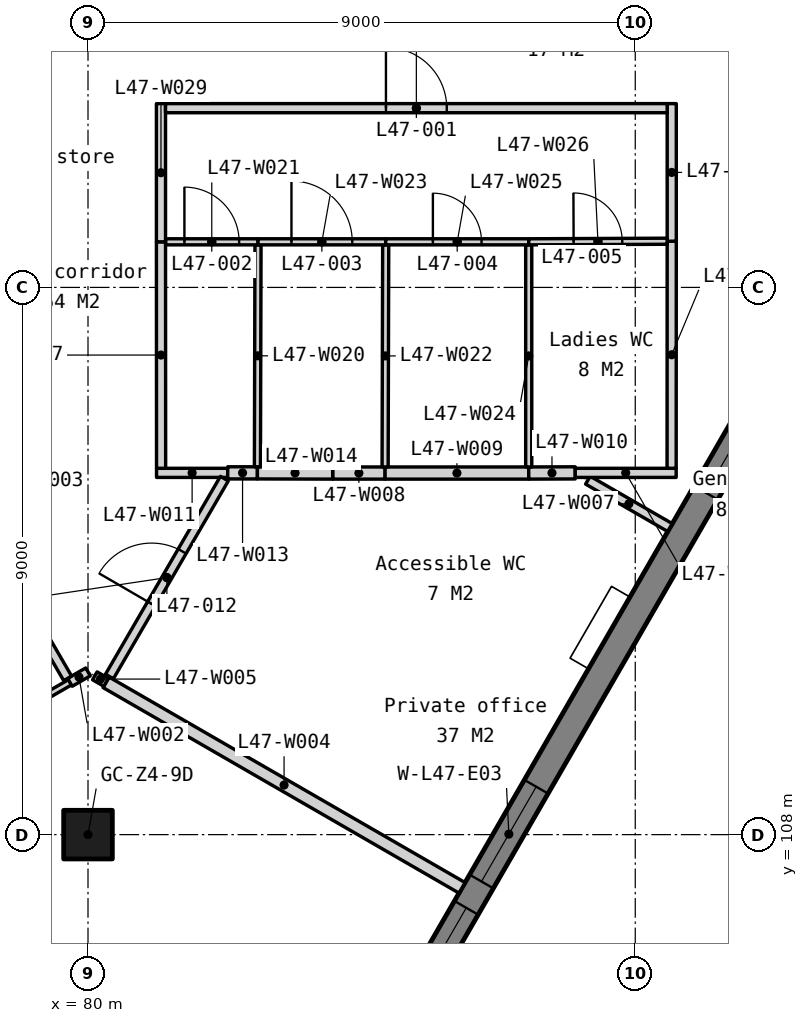
"""IFC4 building model, lengths in metres.
Left out: names, types, materials, properties, quantities, classifications, styles, units other than length and angle.
Written with IfcOpenShell. Run it as: python <this file> out.ifc"""

import sys

from ifc_helpers import new_model, si_unit, direction, frame, frame_2d, origin, origin_2d, place, context, subcontext, project, spatial, polyline, rectangle, outline, extrude, element, fill, save


model = new_model("IFC4")
c1 = context("Model", 3, precision=1e-05, world=origin(), true_north=direction((0.0, 1.0)))
c2 = subcontext(c1, "Body", "Model", "MODEL_VIEW")
j1 = project(units=[si_unit("LENGTHUNIT", "METRE"), si_unit("PLANEANGLEUNIT", "RADIAN")], contexts=[c1])
p1 = place(None, origin())
s1 = spatial("IfcSite", under=j1, at=p1, CompositionType="ELEMENT")
p2 = place(p1, origin())
s2 = spatial("IfcBuilding", under=s1, at=p2, CompositionType="ELEMENT")
p3 = place(p2, frame((0.0, 0.0, 188.0)))
s3 = spatial("IfcBuildingStorey", under=s2, at=p3, CompositionType="ELEMENT", Elevation=188.0)
p4 = place(p3, frame((80.0, 108.0, 0.0), z_axis=(0.0, 0.0, 1.0), x_axis=(1.0, 0.0, 0.0)))
e1 = element("IfcColumn", 1, at=p4, inside=s3, PredefinedType="COLUMN", context=c2, shape_type="SweptSolid", body=[
    extrude(rectangle(XDim=0.8, YDim=0.8, at=origin_2d()), origin(), (0.0, 0.0, 1.0), 3.9),
])
p5 = place(p3, frame((81.505, 98.627, -0.15), z_axis=(0.0, 0.0, 1.0), x_axis=(0.500002199942, 0.866024133644, 0.0)))
e2 = element("IfcWall", 2, at=p5, inside=s3, PredefinedType="SOLIDWALL", context=c2, shape_type="SweptSolid", body=[
    extrude(outline(polyline([(38.729, 0.0), (38.729, 3.9), (0.0, 3.9), (0.0, 0.0), (38.729, 0.0)])), frame((0.0, 0.225, 0.0), z_axis=(0.0, -1.0, 0.0), x_axis=(1.0, 0.0, 0.0)), (0.0, 0.0, 1.0), 0.45),
])
p6 = place(p5, frame((0.807, 0.0, 0.95)))
e3 = element("IfcOpeningElement", 3, at=p6, cuts=e2, PredefinedType="OPENING", context=c2, shape_type="SweptSolid", body=[
    extrude(rectangle(XDim=1.2, YDim=2.2, at=frame_2d((0.6, 1.1))), frame((0.0, 0.235, 0.0), z_axis=(0.0, -1.0, 0.0), x_axis=(1.0, 0.0, 0.0)), (0.0, 0.0, 1.0), 0.47),
])
p7 = place(p5, frame((7.632, 0.0, 0.95)))
e4 = element("IfcOpeningElement", 4, at=p7, cuts=e2, PredefinedType="OPENING", context=c2, shape_type="SweptSolid", body=[
    extrude(rectangle(XDim=1.8, YDim=2.2, at=frame_2d((0.9, 1.1))), frame((0.0, 0.235, 0.0), z_axis=(0.0, -1.0, 0.0), x_axis=(1.0, 0.0, 0.0)), (0.0, 0.0, 1.0), 0.47),
])
p8 = place(p5, frame((9.932, 0.0, 0.95)))
e5 = element("IfcOpeningElement", 5, at=p8, cuts=e2, PredefinedType="OPENING", context=c2, shape_type="SweptSolid", body=[
    extrude(rectangle(XDim=1.8, YDim=2.2, at=frame_2d((0.9, 1.1))), frame((0.0, 0.235, 0.0), z_axis=(0.0, -1.0, 0.0), x_axis=(1.0, 0.0, 0.0)), (0.0, 0.0, 1.0), 0.47),
])
p9 = place(p5, frame((17.315, 0.0, 0.95)))
e6 = element("IfcOpeningElement", 6, at=p9, cuts=e2, PredefinedType="OPENING", context=c2, shape_type="SweptSolid", body=[
    extrude(rectangle(XDim=1.8, YDim=2.2, at=frame_2d((0.9, 1.1))), frame((0.0, 0.235, 0.0), z_axis=(0.0, -1.0, 0.0), x_axis=(1.0, 0.0, 0.0)), (0.0, 0.0, 1.0), 0.47),
])
p10 = place(p5, frame((19.615, 0.0, 0.95)))
e7 = element("IfcOpeningElement", 7, at=p10, cuts=e2, PredefinedType="OPENING", context=c2, shape_type="SweptSolid", body=[
    extrude(rectangle(XDim=1.8, YDim=2.2, at=frame_2d((0.9, 1.1))), frame((0.0, 0.235, 0.0), z_axis=(0.0, -1.0, 0.0), x_axis=(1.0, 0.0, 0.0)), (0.0, 0.0, 1.0), 0.47),
])
p11 = place(p5, frame((26.997, 0.0, 0.95)))
e8 = element("IfcOpeningElement", 8, at=p11, cuts=e2, PredefinedType="OPENING", context=c2, shape_type="SweptSolid", body=[
    extrude(rectangle(XDim=1.8, YDim=2.2, at=frame_2d((0.9, 1.1))), frame((0.0, 0.235, 0.0), z_axis=(0.0, -1.0, 0.0), x_axis=(1.0, 0.0, 0.0)), (0.0, 0.0, 1.0), 0.47),
])
p12 = place(p5, frame((29.297, 0.0, 0.95)))
e9 = element("IfcOpeningElement", 9, at=p12, cuts=e2, PredefinedType="OPENING", context=c2, shape_type="SweptSolid", body=[
    extrude(rectangle(XDim=1.8, YDim=2.2, at=frame_2d((0.9, 1.1))), frame((0.0, 0.235, 0.0), z_axis=(0.0, -1.0, 0.0), x_axis=(1.0, 0.0, 0.0)), (0.0, 0.0, 1.0), 0.47),
])
p13 = place(p5, frame((36.722, 0.0, 0.95)))
e10 = element("IfcOpeningElement", 10, at=p13, cuts=e2, PredefinedType="OPENING", context=c2, shape_type="SweptSolid", body=[
    extrude(rectangle(XDim=1.2, YDim=2.2, at=frame_2d((0.6, 1.1))), frame((0.0, 0.235, 0.0), z_axis=(0.0, -1.0, 0.0), x_axis=(1.0, 0.0, 0.0)), (0.0, 0.0, 1.0), 0.47),
])
p14 = place(p3, frame((73.849, 107.125, 0.0), z_axis=(0.0, 0.0, 1.0), x_axis=(0.866029815523, 0.499992358568, 0.0)))
e11 = element("IfcWall", 11, at=p14, inside=s3, PredefinedType="PARTITIONING", context=c2, shape_type="SweptSolid", body=[
    extrude(rectangle(XDim=6.76, YDim=0.1, at=frame_2d((3.38, 0.0))), origin(), (0.0, 0.0, 1.0), 3.75),
])
p15 = place(p14, frame((2.93, 0.0, 0.0)))
e12 = element("IfcOpeningElement", 12, at=p15, cuts=e11, PredefinedType="OPENING", context=c2, shape_type="SweptSolid", body=[
    extrude(rectangle(XDim=0.9, YDim=2.1, at=frame_2d((0.45, 1.05))), frame((0.0, 0.06, 0.0), z_axis=(0.0, -1.0, 0.0), x_axis=(1.0, 0.0, 0.0)), (0.0, 0.0, 1.0), 0.12),
])
p16 = place(p3, frame((79.703, 110.505, 0.0), z_axis=(0.0, 0.0, 1.0), x_axis=(0.865913012852, 0.500194616298, 0.0)))
e13 = element("IfcWall", 13, at=p16, inside=s3, PredefinedType="PARTITIONING", context=c2, shape_type="SweptSolid", body=[
    extrude(rectangle(XDim=0.343, YDim=0.15, at=frame_2d((0.171, 0.0))), origin(), (0.0, 0.0, 1.0), 3.75),
])
p17 = place(p3, frame((77.274, 114.693, 0.0), z_axis=(0.0, 0.0, 1.0), x_axis=(0.501799348286, -0.864984054223, 0.0)))
e14 = element("IfcWall", 14, at=p17, inside=s3, PredefinedType="PARTITIONING", context=c2, shape_type="SweptSolid", body=[
    extrude(rectangle(XDim=4.766, YDim=0.15, at=frame_2d((2.383, 0.0))), origin(), (0.0, 0.0, 1.0), 3.75),
])
p18 = place(p17, frame((1.883, 0.0, 0.0)))
e15 = element("IfcOpeningElement", 15, at=p18, cuts=e14, PredefinedType="OPENING", context=c2, shape_type="SweptSolid", body=[
    extrude(rectangle(XDim=1.0, YDim=2.1, at=frame_2d((0.5, 1.05))), frame((0.0, 0.085, 0.0), z_axis=(0.0, -1.0, 0.0), x_axis=(1.0, 0.0, 0.0)), (0.0, 0.0, 1.0), 0.17),
])
p19 = place(p3, frame((80.297, 110.505, 0.0), z_axis=(0.0, 0.0, 1.0), x_axis=(0.866029815523, -0.499992358568, 0.0)))
e16 = element("IfcWall", 16, at=p19, inside=s3, PredefinedType="PARTITIONING", context=c2, shape_type="SweptSolid", body=[
    extrude(rectangle(XDim=6.76, YDim=0.2, at=frame_2d((3.38, 0.0))), origin(), (0.0, 0.0, 1.0), 3.75),
])
p20 = place(p3, frame((80.113, 110.612, 0.0), z_axis=(0.0, 0.0, 1.0), x_axis=(0.865765842911, -0.500449303376, 0.0)))
e17 = element("IfcWall", 17, at=p20, inside=s3, PredefinedType="PARTITIONING", context=c2, shape_type="SweptSolid", body=[
    extrude(rectangle(XDim=0.213, YDim=0.15, at=frame_2d((0.106, 0.0))), origin(), (0.0, 0.0, 1.0), 3.75),
])
p21 = place(p3, frame((88.221, 113.83, 0.0), z_axis=(0.0, 0.0, 1.0), x_axis=(0.865997745606, -0.500047902311, 0.0)))
e18 = element("IfcWall", 18, at=p21, inside=s3, PredefinedType="PARTITIONING", context=c2, shape_type="SweptSolid", body=[
    extrude(rectangle(XDim=1.558, YDim=0.15, at=frame_2d((0.779, 0.0))), origin(), (0.0, 0.0, 1.0), 3.75),
])
p22 = place(p3, frame((84.024, 113.947, 0.0), z_axis=(0.0, 0.0, 1.0), x_axis=(1.0, 0.0, 0.0)))
e19 = element("IfcWall", 19, at=p22, inside=s3, PredefinedType="PARTITIONING", context=c2, shape_type="SweptSolid", body=[
    extrude(rectangle(XDim=0.862, YDim=0.2, at=frame_2d((0.431, 0.0))), origin(), (0.0, 0.0, 1.0), 3.75),
])
p23 = place(p3, frame((84.886, 113.947, 0.0), z_axis=(0.0, 0.0, 1.0), x_axis=(1.0, 0.0, 0.0)))
e20 = element("IfcWall", 20, at=p23, inside=s3, PredefinedType="PARTITIONING", context=c2, shape_type="SweptSolid", body=[
    extrude(rectangle(XDim=2.362, YDim=0.2, at=frame_2d((1.181, 0.0))), origin(), (0.0, 0.0, 1.0), 3.75),
])
p24 = place(p3, frame((87.248, 113.947, 0.0), z_axis=(0.0, 0.0, 1.0), x_axis=(0.9999926602, 0.003831389503, 0.0)))
e21 = element("IfcWall", 21, at=p24, inside=s3, PredefinedType="PARTITIONING", context=c2, shape_type="SweptSolid", body=[
    extrude(rectangle(XDim=0.765, YDim=0.2, at=frame_2d((0.382, 0.0))), origin(), (0.0, 0.0, 1.0), 3.75),
])
p25 = place(p3, frame((81.127, 113.95, 0.0), z_axis=(0.0, 0.0, 1.0), x_axis=(1.0, 0.0, 0.0)))
e22 = element("IfcWall", 22, at=p25, inside=s3, PredefinedType="PARTITIONING", context=c2, shape_type="SweptSolid", body=[
    extrude(rectangle(XDim=1.17, YDim=0.15, at=frame_2d((0.585, 0.0))), origin(), (0.0, 0.0, 1.0), 3.75),
])
p26 = place(p3, frame((80.352, 110.6, 0.0), z_axis=(0.0, 0.0, 1.0), x_axis=(0.502155861577, 0.864777133534, 0.0)))
e23 = element("IfcWall", 23, at=p26, inside=s3, PredefinedType="PARTITIONING", context=c2, shape_type="SweptSolid", body=[
    extrude(rectangle(XDim=3.764, YDim=0.15, at=frame_2d((1.882, 0.0))), origin(), (0.0, 0.0, 1.0), 3.75),
])
p27 = place(p26, frame((1.382, 0.0, 0.0)))
e24 = element("IfcOpeningElement", 24, at=p27, cuts=e23, PredefinedType="OPENING", context=c2, shape_type="SweptSolid", body=[
    extrude(rectangle(XDim=1.0, YDim=2.1, at=frame_2d((0.5, 1.05))), frame((0.0, 0.085, 0.0), z_axis=(0.0, -1.0, 0.0), x_axis=(1.0, 0.0, 0.0)), (0.0, 0.0, 1.0), 0.17),
])
p28 = place(p3, frame((82.297, 113.95, 0.0), z_axis=(0.0, 0.0, 1.0), x_axis=(1.0, 0.0, 0.0)))
e25 = element("IfcWall", 25, at=p28, inside=s3, PredefinedType="PARTITIONING", context=c2, shape_type="SweptSolid", body=[
    extrude(rectangle(XDim=0.489, YDim=0.2, at=frame_2d((0.244, 0.0))), origin(), (0.0, 0.0, 1.0), 3.75),
])
p29 = place(p3, frame((82.786, 113.95, 0.0), z_axis=(0.0, 0.0, 1.0), x_axis=(0.999997200094, -0.002366390535, 0.0)))
e26 = element("IfcWall", 26, at=p29, inside=s3, PredefinedType="PARTITIONING", context=c2, shape_type="SweptSolid", body=[
    extrude(rectangle(XDim=1.238, YDim=0.2, at=frame_2d((0.619, 0.0))), origin(), (0.0, 0.0, 1.0), 3.75),
])
p30 = place(p3, frame((88.013, 113.95, 0.0), z_axis=(0.0, 0.0, 1.0), x_axis=(1.0, 0.0, 0.0)))
e27 = element("IfcWall", 27, at=p30, inside=s3, PredefinedType="PARTITIONING", context=c2, shape_type="SweptSolid", body=[
    extrude(rectangle(XDim=1.66, YDim=0.15, at=frame_2d((0.83, 0.0))), origin(), (0.0, 0.0, 1.0), 3.75),
])
p31 = place(p3, frame((89.598, 114.025, 0.0), z_axis=(0.0, 0.0, 1.0), x_axis=(0.000588273642, 0.999999826967, 0.0)))
e28 = element("IfcWall", 28, at=p31, inside=s3, PredefinedType="PARTITIONING", context=c2, shape_type="SweptSolid", body=[
    extrude(rectangle(XDim=3.735, YDim=0.15, at=frame_2d((1.868, 0.0))), origin(), (0.0, 0.0, 1.0), 3.75),
])
p32 = place(p3, frame((89.6, 117.76, 0.0), z_axis=(0.0, 0.0, 1.0), x_axis=(0.0, 1.0, 0.0)))
e29 = element("IfcWall", 29, at=p32, inside=s3, PredefinedType="PARTITIONING", context=c2, shape_type="SweptSolid", body=[
    extrude(rectangle(XDim=2.263, YDim=0.15, at=frame_2d((1.131, 0.0))), origin(), (0.0, 0.0, 1.0), 3.75),
])
p33 = place(p3, frame((82.786, 114.05, 0.0), z_axis=(0.0, 0.0, 1.0), x_axis=(0.002608686776, 0.999996597371, 0.0)))
e30 = element("IfcWall", 30, at=p33, inside=s3, PredefinedType="PARTITIONING", context=c2, shape_type="SweptSolid", body=[
    extrude(rectangle(XDim=3.65, YDim=0.1, at=frame_2d((1.825, 0.0))), origin(), (0.0, 0.0, 1.0), 3.75),
])
p34 = place(p3, frame((81.275, 117.75, 0.0), z_axis=(0.0, 0.0, 1.0), x_axis=(1.0, 0.0, 0.0)))
e31 = element("IfcWall", 31, at=p34, inside=s3, PredefinedType="PARTITIONING", context=c2, shape_type="SweptSolid", body=[
    extrude(rectangle(XDim=1.521, YDim=0.1, at=frame_2d((0.76, 0.0))), origin(), (0.0, 0.0, 1.0), 3.75),
])
p35 = place(p34, frame((0.311, 0.0, 0.0)))
e32 = element("IfcOpeningElement", 32, at=p35, cuts=e31, PredefinedType="OPENING", context=c2, shape_type="SweptSolid", body=[
    extrude(rectangle(XDim=0.9, YDim=2.1, at=frame_2d((0.45, 1.05))), frame((0.0, 0.06, 0.0), z_axis=(0.0, -1.0, 0.0), x_axis=(1.0, 0.0, 0.0)), (0.0, 0.0, 1.0), 0.12),
])
p36 = place(p3, frame((84.886, 114.047, 0.0), z_axis=(0.0, 0.0, 1.0), x_axis=(0.00260659454, 0.999996602827, 0.0)))
e33 = element("IfcWall", 33, at=p36, inside=s3, PredefinedType="PARTITIONING", context=c2, shape_type="SweptSolid", body=[
    extrude(rectangle(XDim=3.653, YDim=0.1, at=frame_2d((1.826, 0.0))), origin(), (0.0, 0.0, 1.0), 3.75),
])
p37 = place(p3, frame((82.796, 117.75, 0.0), z_axis=(0.0, 0.0, 1.0), x_axis=(1.0, 0.0, 0.0)))
e34 = element("IfcWall", 34, at=p37, inside=s3, PredefinedType="PARTITIONING", context=c2, shape_type="SweptSolid", body=[
    extrude(rectangle(XDim=2.1, YDim=0.1, at=frame_2d((1.05, 0.0))), origin(), (0.0, 0.0, 1.0), 3.75),
])
p38 = place(p37, frame((0.55, 0.0, 0.0)))
e35 = element("IfcOpeningElement", 35, at=p38, cuts=e34, PredefinedType="OPENING", context=c2, shape_type="SweptSolid", body=[
    extrude(rectangle(XDim=1.0, YDim=2.1, at=frame_2d((0.5, 1.05))), frame((0.0, 0.06, 0.0), z_axis=(0.0, -1.0, 0.0), x_axis=(1.0, 0.0, 0.0)), (0.0, 0.0, 1.0), 0.12),
])
p39 = place(p3, frame((87.248, 114.047, 0.0), z_axis=(0.0, 0.0, 1.0), x_axis=(0.0, 1.0, 0.0)))
e36 = element("IfcWall", 36, at=p39, inside=s3, PredefinedType="PARTITIONING", context=c2, shape_type="SweptSolid", body=[
    extrude(rectangle(XDim=3.653, YDim=0.1, at=frame_2d((1.826, 0.0))), origin(), (0.0, 0.0, 1.0), 3.75),
])
p40 = place(p3, frame((84.896, 117.75, 0.0), z_axis=(0.0, 0.0, 1.0), x_axis=(1.0, 0.0, 0.0)))
e37 = element("IfcWall", 37, at=p40, inside=s3, PredefinedType="PARTITIONING", context=c2, shape_type="SweptSolid", body=[
    extrude(rectangle(XDim=2.352, YDim=0.1, at=frame_2d((1.176, 0.0))), origin(), (0.0, 0.0, 1.0), 3.75),
])
p41 = place(p40, frame((0.776, 0.0, 0.0)))
e38 = element("IfcOpeningElement", 38, at=p41, cuts=e37, PredefinedType="OPENING", context=c2, shape_type="SweptSolid", body=[
    extrude(rectangle(XDim=0.8, YDim=2.1, at=frame_2d((0.4, 1.05))), frame((0.0, 0.06, 0.0), z_axis=(0.0, -1.0, 0.0), x_axis=(1.0, 0.0, 0.0)), (0.0, 0.0, 1.0), 0.12),
])
p42 = place(p3, frame((87.248, 117.75, 0.0), z_axis=(0.0, 0.0, 1.0), x_axis=(0.999990802005, 0.00428904483, 0.0)))
e39 = element("IfcWall", 39, at=p42, inside=s3, PredefinedType="PARTITIONING", context=c2, shape_type="SweptSolid", body=[
    extrude(rectangle(XDim=2.277, YDim=0.1, at=frame_2d((1.138, 0.0))), origin(), (0.0, 0.0, 1.0), 3.75),
])
p43 = place(p42, frame((0.739, 0.0, 0.0)))
e40 = element("IfcOpeningElement", 40, at=p43, cuts=e39, PredefinedType="OPENING", context=c2, shape_type="SweptSolid", body=[
    extrude(rectangle(XDim=0.8, YDim=2.1, at=frame_2d((0.4, 1.05))), frame((0.0, 0.06, 0.0), z_axis=(0.0, -1.0, 0.0), x_axis=(1.0, 0.0, 0.0)), (0.0, 0.0, 1.0), 0.12),
])
p44 = place(p3, frame((81.202, 114.025, 0.0), z_axis=(0.0, 0.0, 1.0), x_axis=(-0.000524315041, 0.999999862547, 0.0)))
e41 = element("IfcWall", 41, at=p44, inside=s3, PredefinedType="PARTITIONING", context=c2, shape_type="SweptSolid", body=[
    extrude(rectangle(XDim=3.725, YDim=0.15, at=frame_2d((1.863, 0.0))), origin(), (0.0, 0.0, 1.0), 3.75),
])
p45 = place(p3, frame((81.2, 117.75, 0.0), z_axis=(0.0, 0.0, 1.0), x_axis=(0.0, 1.0, 0.0)))
e42 = element("IfcWall", 42, at=p45, inside=s3, PredefinedType="PARTITIONING", context=c2, shape_type="SweptSolid", body=[
    extrude(rectangle(XDim=2.273, YDim=0.15, at=frame_2d((1.136, 0.0))), origin(), (0.0, 0.0, 1.0), 3.75),
])
p46 = place(p3, frame((81.275, 119.948, 0.0), z_axis=(0.0, 0.0, 1.0), x_axis=(1.0, 0.0, 0.0)))
e43 = element("IfcWall", 43, at=p46, inside=s3, PredefinedType="PARTITIONING", context=c2, shape_type="SweptSolid", body=[
    extrude(rectangle(XDim=8.25, YDim=0.15, at=frame_2d((4.125, 0.0))), origin(), (0.0, 0.0, 1.0), 3.75),
])
p47 = place(p46, frame((3.625, 0.0, 0.0)))
e44 = element("IfcOpeningElement", 44, at=p47, cuts=e43, PredefinedType="OPENING", context=c2, shape_type="SweptSolid", body=[
    extrude(rectangle(XDim=1.0, YDim=2.1, at=frame_2d((0.5, 1.05))), frame((0.0, 0.085, 0.0), z_axis=(0.0, -1.0, 0.0), x_axis=(1.0, 0.0, 0.0)), (0.0, 0.0, 1.0), 0.17),
])
p48 = place(p7, origin())
e45 = element("IfcWindow", 45, at=p48, inside=s3, PartitioningType="SINGLE_PANEL", PredefinedType="WINDOW", context=c2, shape_type="SweptSolid", body=[
    extrude(rectangle(XDim=1.8, YDim=2.2, at=frame_2d((0.9, 1.1))), frame((0.0, 0.03, 0.0), z_axis=(0.0, -1.0, 0.0), x_axis=(1.0, 0.0, 0.0)), (0.0, 0.0, 1.0), 0.06),
])
fill(e4, e45)
p49 = place(p8, origin())
e46 = element("IfcWindow", 46, at=p49, inside=s3, PartitioningType="SINGLE_PANEL", PredefinedType="WINDOW", context=c2, shape_type="SweptSolid", body=[
    extrude(rectangle(XDim=1.8, YDim=2.2, at=frame_2d((0.9, 1.1))), frame((0.0, 0.03, 0.0), z_axis=(0.0, -1.0, 0.0), x_axis=(1.0, 0.0, 0.0)), (0.0, 0.0, 1.0), 0.06),
])
fill(e5, e46)
p50 = place(p9, origin())
e47 = element("IfcWindow", 47, at=p50, inside=s3, PartitioningType="SINGLE_PANEL", PredefinedType="WINDOW", context=c2, shape_type="SweptSolid", body=[
    extrude(rectangle(XDim=1.8, YDim=2.2, at=frame_2d((0.9, 1.1))), frame((0.0, 0.03, 0.0), z_axis=(0.0, -1.0, 0.0), x_axis=(1.0, 0.0, 0.0)), (0.0, 0.0, 1.0), 0.06),
])
fill(e6, e47)
p51 = place(p47, origin())
e48 = element("IfcDoor", 48, at=p51, inside=s3, OperationType="SINGLE_SWING_LEFT", PredefinedType="DOOR", context=c2, shape_type="SweptSolid", body=[
    extrude(rectangle(XDim=1.0, YDim=2.1, at=frame_2d((0.5, 1.05))), frame((0.0, 0.025, 0.0), z_axis=(0.0, -1.0, 0.0), x_axis=(1.0, 0.0, 0.0)), (0.0, 0.0, 1.0), 0.05),
])
fill(e44, e48)
p52 = place(p35, origin())
e49 = element("IfcDoor", 49, at=p52, inside=s3, OperationType="SINGLE_SWING_LEFT", PredefinedType="DOOR", context=c2, shape_type="SweptSolid", body=[
    extrude(rectangle(XDim=0.9, YDim=2.1, at=frame_2d((0.45, 1.05))), frame((0.0, 0.025, 0.0), z_axis=(0.0, -1.0, 0.0), x_axis=(1.0, 0.0, 0.0)), (0.0, 0.0, 1.0), 0.05),
])
fill(e32, e49)
p53 = place(p38, origin())
e50 = element("IfcDoor", 50, at=p53, inside=s3, OperationType="SINGLE_SWING_LEFT", PredefinedType="DOOR", context=c2, shape_type="SweptSolid", body=[
    extrude(rectangle(XDim=1.0, YDim=2.1, at=frame_2d((0.5, 1.05))), frame((0.0, 0.025, 0.0), z_axis=(0.0, -1.0, 0.0), x_axis=(1.0, 0.0, 0.0)), (0.0, 0.0, 1.0), 0.05),
])
fill(e35, e50)
p54 = place(p41, origin())
e51 = element("IfcDoor", 51, at=p54, inside=s3, OperationType="SINGLE_SWING_LEFT", PredefinedType="DOOR", context=c2, shape_type="SweptSolid", body=[
    extrude(rectangle(XDim=0.8, YDim=2.1, at=frame_2d((0.4, 1.05))), frame((0.0, 0.025, 0.0), z_axis=(0.0, -1.0, 0.0), x_axis=(1.0, 0.0, 0.0)), (0.0, 0.0, 1.0), 0.05),
])
fill(e38, e51)
p55 = place(p43, origin())
e52 = element("IfcDoor", 52, at=p55, inside=s3, OperationType="SINGLE_SWING_LEFT", PredefinedType="DOOR", context=c2, shape_type="SweptSolid", body=[
    extrude(rectangle(XDim=0.8, YDim=2.1, at=frame_2d((0.4, 1.05))), frame((0.0, 0.025, 0.0), z_axis=(0.0, -1.0, 0.0), x_axis=(1.0, 0.0, 0.0)), (0.0, 0.0, 1.0), 0.05),
])
fill(e40, e52)
p56 = place(p27, origin())
e53 = element("IfcDoor", 53, at=p56, inside=s3, OperationType="SINGLE_SWING_LEFT", PredefinedType="DOOR", context=c2, shape_type="SweptSolid", body=[
    extrude(rectangle(XDim=1.0, YDim=2.1, at=frame_2d((0.5, 1.05))), frame((0.0, 0.025, 0.0), z_axis=(0.0, -1.0, 0.0), x_axis=(1.0, 0.0, 0.0)), (0.0, 0.0, 1.0), 0.05),
])
fill(e24, e53)
save(model, sys.argv[1])
